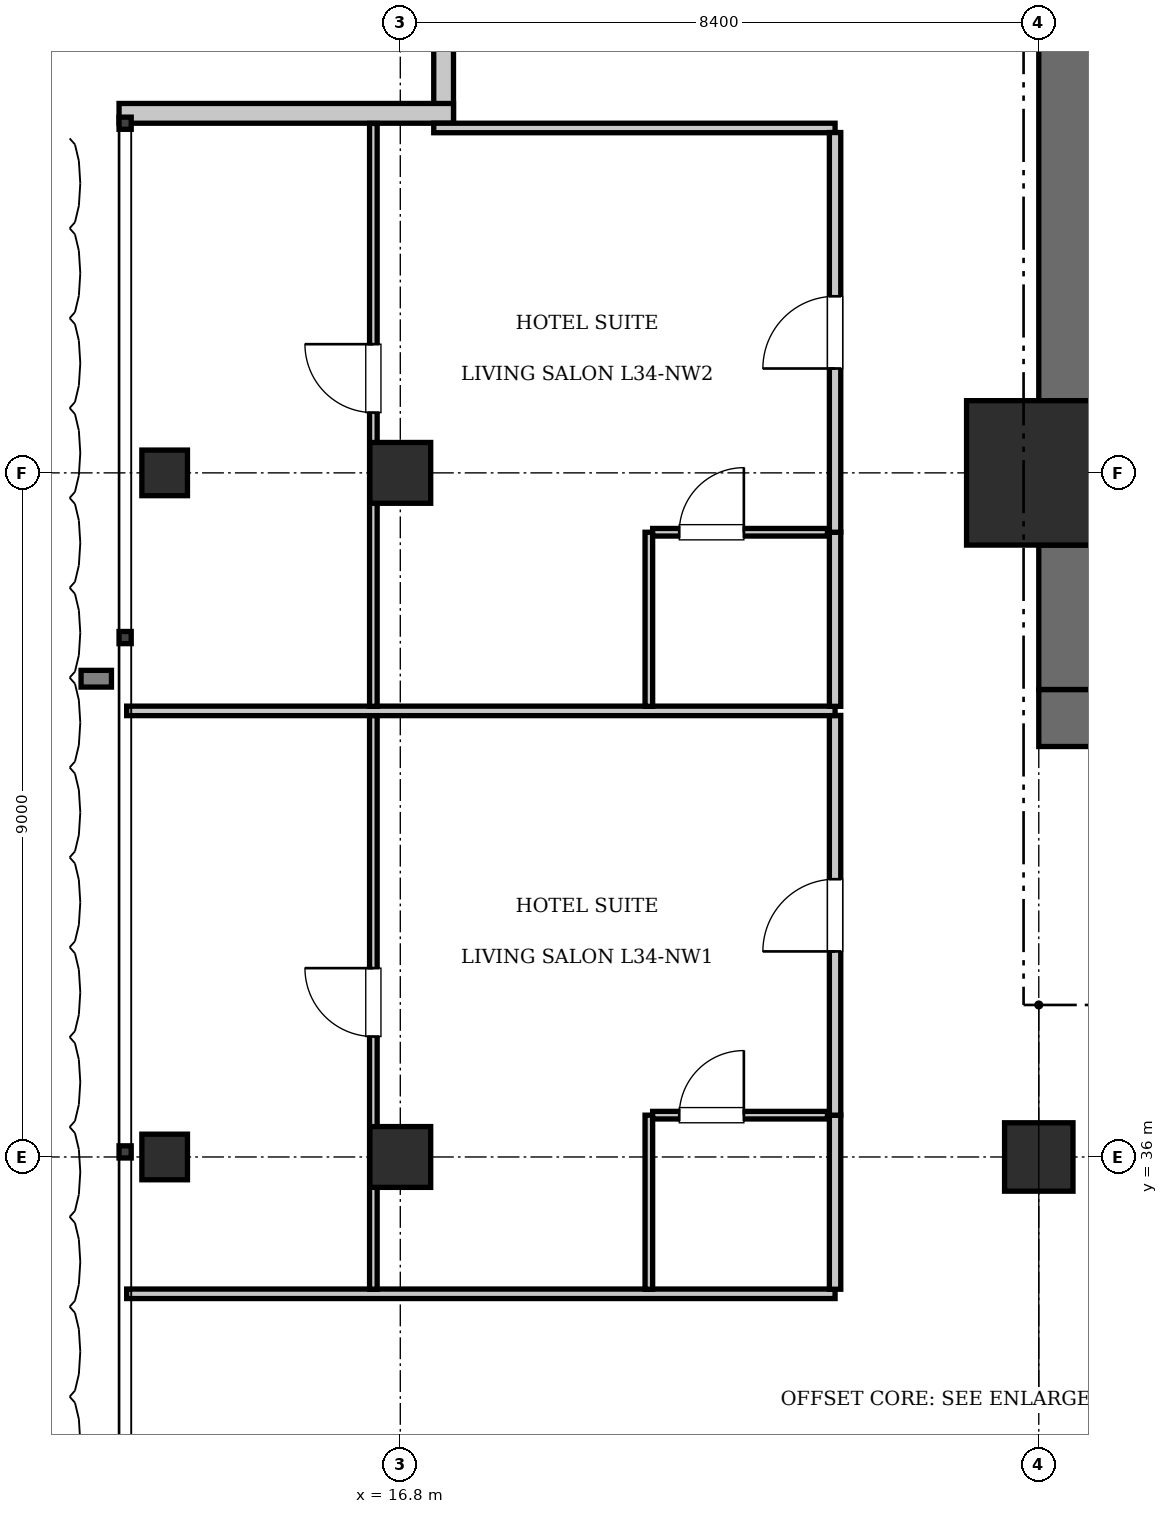
"""IFC4 building model, lengths in metres.
Left out: names, types, materials, properties, quantities, classifications, styles, units other than length and angle.
Written with IfcOpenShell. Run it as: python <this file> out.ifc"""

import sys

from ifc_helpers import new_model, si_unit, direction, frame, frame_2d, origin, origin_2d, place, context, subcontext, project, spatial, rectangle, i_section, extrude, element, fill, save


model = new_model("IFC4")
c1 = context("Model", 3, precision=1e-05, world=origin(), true_north=direction((0.0, 1.0)))
c2 = subcontext(c1, "Body", "Model", "MODEL_VIEW")
j1 = project(units=[si_unit("LENGTHUNIT", "METRE"), si_unit("PLANEANGLEUNIT", "RADIAN")], contexts=[c1])
p1 = place(None, origin())
s1 = spatial("IfcSite", under=j1, at=p1, CompositionType="ELEMENT")
p2 = place(p1, origin())
s2 = spatial("IfcBuilding", under=s1, at=p2, CompositionType="ELEMENT")
p3 = place(p2, frame((0.0, 0.0, 142.8)))
s3 = spatial("IfcBuildingStorey", under=s2, at=p3, CompositionType="ELEMENT", Elevation=142.8)
p4 = place(p3, frame((25.2, 45.0, 0.0), z_axis=(0.0, 0.0, 1.0), x_axis=(1.0, 0.0, 0.0)))
e1 = element("IfcColumn", 1, at=p4, inside=s3, PredefinedType="COLUMN", context=c2, shape_type="SweptSolid", body=[
    extrude(rectangle(XDim=1.9, YDim=1.9, at=origin_2d()), origin(), (0.0, 0.0, 1.0), 3.85),
])
p5 = place(p3, frame((25.2, 41.775, 0.0), z_axis=(0.0, 0.0, 1.0), x_axis=(1.0, 0.0, 0.0)))
e2 = element("IfcWall", 2, at=p5, inside=s3, PredefinedType="SHEAR", context=c2, shape_type="SweptSolid", body=[
    extrude(rectangle(XDim=6.8, YDim=0.75, at=frame_2d((3.4, 0.0))), origin(), (0.0, 0.0, 1.0), 3.85),
])
p6 = place(p5, frame((1.65, 0.0, 0.0)))
e3 = element("IfcOpeningElement", 3, at=p6, cuts=e2, PredefinedType="OPENING", context=c2, shape_type="SweptSolid", body=[
    extrude(rectangle(XDim=1.15, YDim=2.15, at=frame_2d((0.575, 1.075))), frame((0.0, 0.385, 0.0), z_axis=(0.0, -1.0, 0.0), x_axis=(1.0, 0.0, 0.0)), (0.0, 0.0, 1.0), 0.77),
])
p7 = place(p5, frame((5.15, 0.0, 0.0)))
e4 = element("IfcOpeningElement", 4, at=p7, cuts=e2, PredefinedType="OPENING", context=c2, shape_type="SweptSolid", body=[
    extrude(rectangle(XDim=1.1, YDim=2.2, at=frame_2d((0.55, 1.1))), frame((0.0, 0.385, 0.0), z_axis=(0.0, -1.0, 0.0), x_axis=(1.0, 0.0, 0.0)), (0.0, 0.0, 1.0), 0.77),
])
p8 = place(p3, frame((25.575, 42.15, 0.0), z_axis=(0.0, 0.0, 1.0), x_axis=(0.0, 1.0, 0.0)))
e5 = element("IfcWall", 5, at=p8, inside=s3, PredefinedType="SHEAR", context=c2, shape_type="SweptSolid", body=[
    extrude(rectangle(XDim=1.9, YDim=0.75, at=frame_2d((0.95, 0.0))), origin(), (0.0, 0.0, 1.0), 3.85),
])
p9 = place(p3, frame((25.575, 45.95, 0.0), z_axis=(0.0, 0.0, 1.0), x_axis=(0.0, 1.0, 0.0)))
e6 = element("IfcWall", 6, at=p9, inside=s3, PredefinedType="SHEAR", context=c2, shape_type="SweptSolid", body=[
    extrude(rectangle(XDim=7.3, YDim=0.75, at=frame_2d((3.65, 0.0))), origin(), (0.0, 0.0, 1.0), 3.85),
])
p10 = place(p3, frame((25.2, 36.0, 0.0), z_axis=(0.0, 0.0, 1.0), x_axis=(1.0, 0.0, 0.0)))
e7 = element("IfcColumn", 7, at=p10, inside=s3, PredefinedType="COLUMN", context=c2, shape_type="SweptSolid", body=[
    extrude(rectangle(XDim=0.9, YDim=0.9, at=origin_2d()), origin(), (0.0, 0.0, 1.0), 3.85),
])
for number, where, z_axis, x_axis in (
    (8, (16.8, 36.0, 0.0), (0.0, 0.0, 1.0), (1.0, 0.0, 0.0)),
    (9, (16.8, 45.0, 0.0), (0.0, 0.0, 1.0), (1.0, 0.0, 0.0)),
):
    element("IfcColumn", number, at=place(p3, frame(where, z_axis=z_axis, x_axis=x_axis)), inside=s3, PredefinedType="COLUMN", context=c2, shape_type="SweptSolid", body=[
        extrude(rectangle(XDim=0.8, YDim=0.8, at=origin_2d()), origin(), (0.0, 0.0, 1.0), 3.85),
    ])
for number, where, z_axis, x_axis in (
    (10, (13.7, 36.0, 0.0), (0.0, 0.0, 1.0), (1.0, 0.0, 0.0)),
    (11, (13.7, 45.0, 0.0), (0.0, 0.0, 1.0), (1.0, 0.0, 0.0)),
):
    element("IfcColumn", number, at=place(p3, frame(where, z_axis=z_axis, x_axis=x_axis)), inside=s3, PredefinedType="COLUMN", context=c2, shape_type="SweptSolid", body=[
        extrude(i_section(OverallWidth=0.6, OverallDepth=0.6, WebThickness=0.025, FlangeThickness=0.038, at=origin_2d()), origin(), (0.0, 0.0, 1.0), 3.85),
    ])
for number, where, z_axis, x_axis in (
    (12, (17.37, 49.6, 0.0), (0.0, 0.0, 1.0), (0.0, 1.0, 0.0)),
    (13, (13.1, 49.73, 0.0), (0.0, 0.0, 1.0), (1.0, 0.0, 0.0)),
):
    element("IfcWall", number, at=place(p3, frame(where, z_axis=z_axis, x_axis=x_axis)), inside=s3, PredefinedType="SOLIDWALL", context=c2, shape_type="SweptSolid", body=[
        extrude(rectangle(XDim=4.4, YDim=0.26, at=frame_2d((2.2, 0.0))), origin(), (0.0, 0.0, 1.0), 3.61),
    ])
p11 = place(p3, frame((13.2, 34.2, 0.0), z_axis=(0.0, 0.0, 1.0), x_axis=(1.0, 0.0, 0.0)))
e14 = element("IfcWall", 14, at=p11, inside=s3, PredefinedType="PARTITIONING", context=c2, shape_type="SweptSolid", body=[
    extrude(rectangle(XDim=9.32, YDim=0.125, at=frame_2d((4.66, 0.0))), origin(), (0.0, 0.0, 1.0), 3.61),
])
p12 = place(p3, frame((17.24, 49.538, 0.0), z_axis=(0.0, 0.0, 1.0), x_axis=(1.0, 0.0, 0.0)))
e15 = element("IfcWall", 15, at=p12, inside=s3, PredefinedType="PARTITIONING", context=c2, shape_type="SweptSolid", body=[
    extrude(rectangle(XDim=5.28, YDim=0.125, at=frame_2d((2.64, 0.0))), origin(), (0.0, 0.0, 1.0), 3.61),
])
p13 = place(p3, frame((22.52, 34.26, 0.0), z_axis=(0.0, 0.0, 1.0), x_axis=(0.0, 1.0, 0.0)))
e16 = element("IfcWall", 16, at=p13, inside=s3, PredefinedType="PARTITIONING", context=c2, shape_type="SweptSolid", body=[
    extrude(rectangle(XDim=2.29, YDim=0.15, at=frame_2d((1.145, 0.0))), origin(), (0.0, 0.0, 1.0), 3.61),
])
p14 = place(p3, frame((22.52, 36.55, 0.0), z_axis=(0.0, 0.0, 1.0), x_axis=(0.0, 1.0, 0.0)))
e17 = element("IfcWall", 17, at=p14, inside=s3, PredefinedType="PARTITIONING", context=c2, shape_type="SweptSolid", body=[
    extrude(rectangle(XDim=5.259, YDim=0.15, at=frame_2d((2.629, 0.0))), origin(), (0.0, 0.0, 1.0), 3.61),
])
p15 = place(p14, frame((2.154, 0.0, 0.0)))
e18 = element("IfcOpeningElement", 18, at=p15, cuts=e17, PredefinedType="OPENING", context=c2, shape_type="SweptSolid", body=[
    extrude(rectangle(XDim=0.95, YDim=2.15, at=frame_2d((0.475, 1.075))), frame((0.0, 0.085, 0.0), z_axis=(0.0, -1.0, 0.0), x_axis=(1.0, 0.0, 0.0)), (0.0, 0.0, 1.0), 0.17),
])
p16 = place(p3, frame((20.07, 34.26, 0.0), z_axis=(0.0, 0.0, 1.0), x_axis=(0.0, 1.0, 0.0)))
e19 = element("IfcWall", 19, at=p16, inside=s3, PredefinedType="PARTITIONING", context=c2, shape_type="SweptSolid", body=[
    extrude(rectangle(XDim=2.29, YDim=0.1, at=frame_2d((1.145, 0.0))), origin(), (0.0, 0.0, 1.0), 3.61),
])
p17 = place(p3, frame((20.12, 36.55, 0.0), z_axis=(0.0, 0.0, 1.0), x_axis=(1.0, 0.0, 0.0)))
e20 = element("IfcWall", 20, at=p17, inside=s3, PredefinedType="PARTITIONING", context=c2, shape_type="SweptSolid", body=[
    extrude(rectangle(XDim=2.3, YDim=0.1, at=frame_2d((1.15, 0.0))), origin(), (0.0, 0.0, 1.0), 3.61),
])
p18 = place(p17, frame((0.35, 0.0, 0.0)))
e21 = element("IfcOpeningElement", 21, at=p18, cuts=e20, PredefinedType="OPENING", context=c2, shape_type="SweptSolid", body=[
    extrude(rectangle(XDim=0.85, YDim=2.1, at=frame_2d((0.425, 1.05))), frame((0.0, 0.06, 0.0), z_axis=(0.0, -1.0, 0.0), x_axis=(1.0, 0.0, 0.0)), (0.0, 0.0, 1.0), 0.12),
])
p19 = place(p3, frame((16.446, 34.26, 0.0), z_axis=(0.0, 0.0, 1.0), x_axis=(0.0, 1.0, 0.0)))
e22 = element("IfcWall", 22, at=p19, inside=s3, PredefinedType="PARTITIONING", context=c2, shape_type="SweptSolid", body=[
    extrude(rectangle(XDim=7.549, YDim=0.1, at=frame_2d((3.774, 0.0))), origin(), (0.0, 0.0, 1.0), 3.61),
])
p20 = place(p19, frame((3.324, 0.0, 0.0)))
e23 = element("IfcOpeningElement", 23, at=p20, cuts=e22, PredefinedType="OPENING", context=c2, shape_type="SweptSolid", body=[
    extrude(rectangle(XDim=0.9, YDim=2.1, at=frame_2d((0.45, 1.05))), frame((0.0, 0.06, 0.0), z_axis=(0.0, -1.0, 0.0), x_axis=(1.0, 0.0, 0.0)), (0.0, 0.0, 1.0), 0.12),
])
p21 = place(p3, frame((13.2, 41.869, 0.0), z_axis=(0.0, 0.0, 1.0), x_axis=(1.0, 0.0, 0.0)))
e24 = element("IfcWall", 24, at=p21, inside=s3, PredefinedType="PARTITIONING", context=c2, shape_type="SweptSolid", body=[
    extrude(rectangle(XDim=9.32, YDim=0.125, at=frame_2d((4.66, 0.0))), origin(), (0.0, 0.0, 1.0), 3.61),
])
p22 = place(p3, frame((22.52, 41.929, 0.0), z_axis=(0.0, 0.0, 1.0), x_axis=(0.0, 1.0, 0.0)))
e25 = element("IfcWall", 25, at=p22, inside=s3, PredefinedType="PARTITIONING", context=c2, shape_type="SweptSolid", body=[
    extrude(rectangle(XDim=2.29, YDim=0.15, at=frame_2d((1.145, 0.0))), origin(), (0.0, 0.0, 1.0), 3.61),
])
p23 = place(p3, frame((22.52, 44.219, 0.0), z_axis=(0.0, 0.0, 1.0), x_axis=(0.0, 1.0, 0.0)))
e26 = element("IfcWall", 26, at=p23, inside=s3, PredefinedType="PARTITIONING", context=c2, shape_type="SweptSolid", body=[
    extrude(rectangle(XDim=5.259, YDim=0.15, at=frame_2d((2.629, 0.0))), origin(), (0.0, 0.0, 1.0), 3.61),
])
p24 = place(p23, frame((2.154, 0.0, 0.0)))
e27 = element("IfcOpeningElement", 27, at=p24, cuts=e26, PredefinedType="OPENING", context=c2, shape_type="SweptSolid", body=[
    extrude(rectangle(XDim=0.95, YDim=2.15, at=frame_2d((0.475, 1.075))), frame((0.0, 0.085, 0.0), z_axis=(0.0, -1.0, 0.0), x_axis=(1.0, 0.0, 0.0)), (0.0, 0.0, 1.0), 0.17),
])
p25 = place(p3, frame((20.07, 41.929, 0.0), z_axis=(0.0, 0.0, 1.0), x_axis=(0.0, 1.0, 0.0)))
e28 = element("IfcWall", 28, at=p25, inside=s3, PredefinedType="PARTITIONING", context=c2, shape_type="SweptSolid", body=[
    extrude(rectangle(XDim=2.29, YDim=0.1, at=frame_2d((1.145, 0.0))), origin(), (0.0, 0.0, 1.0), 3.61),
])
p26 = place(p3, frame((20.12, 44.219, 0.0), z_axis=(0.0, 0.0, 1.0), x_axis=(1.0, 0.0, 0.0)))
e29 = element("IfcWall", 29, at=p26, inside=s3, PredefinedType="PARTITIONING", context=c2, shape_type="SweptSolid", body=[
    extrude(rectangle(XDim=2.3, YDim=0.1, at=frame_2d((1.15, 0.0))), origin(), (0.0, 0.0, 1.0), 3.61),
])
p27 = place(p26, frame((0.35, 0.0, 0.0)))
e30 = element("IfcOpeningElement", 30, at=p27, cuts=e29, PredefinedType="OPENING", context=c2, shape_type="SweptSolid", body=[
    extrude(rectangle(XDim=0.85, YDim=2.1, at=frame_2d((0.425, 1.05))), frame((0.0, 0.06, 0.0), z_axis=(0.0, -1.0, 0.0), x_axis=(1.0, 0.0, 0.0)), (0.0, 0.0, 1.0), 0.12),
])
p28 = place(p3, frame((16.446, 41.929, 0.0), z_axis=(0.0, 0.0, 1.0), x_axis=(0.0, 1.0, 0.0)))
e31 = element("IfcWall", 31, at=p28, inside=s3, PredefinedType="PARTITIONING", context=c2, shape_type="SweptSolid", body=[
    extrude(rectangle(XDim=7.669, YDim=0.1, at=frame_2d((3.834, 0.0))), origin(), (0.0, 0.0, 1.0), 3.61),
])
p29 = place(p28, frame((3.864, 0.0, 0.0)))
e32 = element("IfcOpeningElement", 32, at=p29, cuts=e31, PredefinedType="OPENING", context=c2, shape_type="SweptSolid", body=[
    extrude(rectangle(XDim=0.9, YDim=2.1, at=frame_2d((0.45, 1.05))), frame((0.0, 0.06, 0.0), z_axis=(0.0, -1.0, 0.0), x_axis=(1.0, 0.0, 0.0)), (0.0, 0.0, 1.0), 0.12),
])
p30 = place(p18, origin())
e33 = element("IfcDoor", 33, at=p30, inside=s3, OperationType="SINGLE_SWING_RIGHT", PredefinedType="DOOR", context=c2, shape_type="SweptSolid", body=[
    extrude(rectangle(XDim=0.85, YDim=2.1, at=frame_2d((0.425, 1.05))), frame((0.0, 0.025, 0.0), z_axis=(0.0, -1.0, 0.0), x_axis=(1.0, 0.0, 0.0)), (0.0, 0.0, 1.0), 0.05),
])
fill(e21, e33)
p31 = place(p15, origin())
e34 = element("IfcDoor", 34, at=p31, inside=s3, OperationType="SINGLE_SWING_LEFT", PredefinedType="DOOR", context=c2, shape_type="SweptSolid", body=[
    extrude(rectangle(XDim=0.95, YDim=2.15, at=frame_2d((0.475, 1.075))), frame((0.0, 0.025, 0.0), z_axis=(0.0, -1.0, 0.0), x_axis=(1.0, 0.0, 0.0)), (0.0, 0.0, 1.0), 0.05),
])
fill(e18, e34)
p32 = place(p20, origin())
e35 = element("IfcDoor", 35, at=p32, inside=s3, OperationType="SINGLE_SWING_RIGHT", PredefinedType="DOOR", context=c2, shape_type="SweptSolid", body=[
    extrude(rectangle(XDim=0.9, YDim=2.1, at=frame_2d((0.45, 1.05))), frame((0.0, 0.025, 0.0), z_axis=(0.0, -1.0, 0.0), x_axis=(1.0, 0.0, 0.0)), (0.0, 0.0, 1.0), 0.05),
])
fill(e23, e35)
p33 = place(p27, origin())
e36 = element("IfcDoor", 36, at=p33, inside=s3, OperationType="SINGLE_SWING_RIGHT", PredefinedType="DOOR", context=c2, shape_type="SweptSolid", body=[
    extrude(rectangle(XDim=0.85, YDim=2.1, at=frame_2d((0.425, 1.05))), frame((0.0, 0.025, 0.0), z_axis=(0.0, -1.0, 0.0), x_axis=(1.0, 0.0, 0.0)), (0.0, 0.0, 1.0), 0.05),
])
fill(e30, e36)
p34 = place(p24, origin())
e37 = element("IfcDoor", 37, at=p34, inside=s3, OperationType="SINGLE_SWING_LEFT", PredefinedType="DOOR", context=c2, shape_type="SweptSolid", body=[
    extrude(rectangle(XDim=0.95, YDim=2.15, at=frame_2d((0.475, 1.075))), frame((0.0, 0.025, 0.0), z_axis=(0.0, -1.0, 0.0), x_axis=(1.0, 0.0, 0.0)), (0.0, 0.0, 1.0), 0.05),
])
fill(e27, e37)
p35 = place(p29, origin())
e38 = element("IfcDoor", 38, at=p35, inside=s3, OperationType="SINGLE_SWING_RIGHT", PredefinedType="DOOR", context=c2, shape_type="SweptSolid", body=[
    extrude(rectangle(XDim=0.9, YDim=2.1, at=frame_2d((0.45, 1.05))), frame((0.0, 0.025, 0.0), z_axis=(0.0, -1.0, 0.0), x_axis=(1.0, 0.0, 0.0)), (0.0, 0.0, 1.0), 0.05),
])
fill(e32, e38)
save(model, sys.argv[1])
